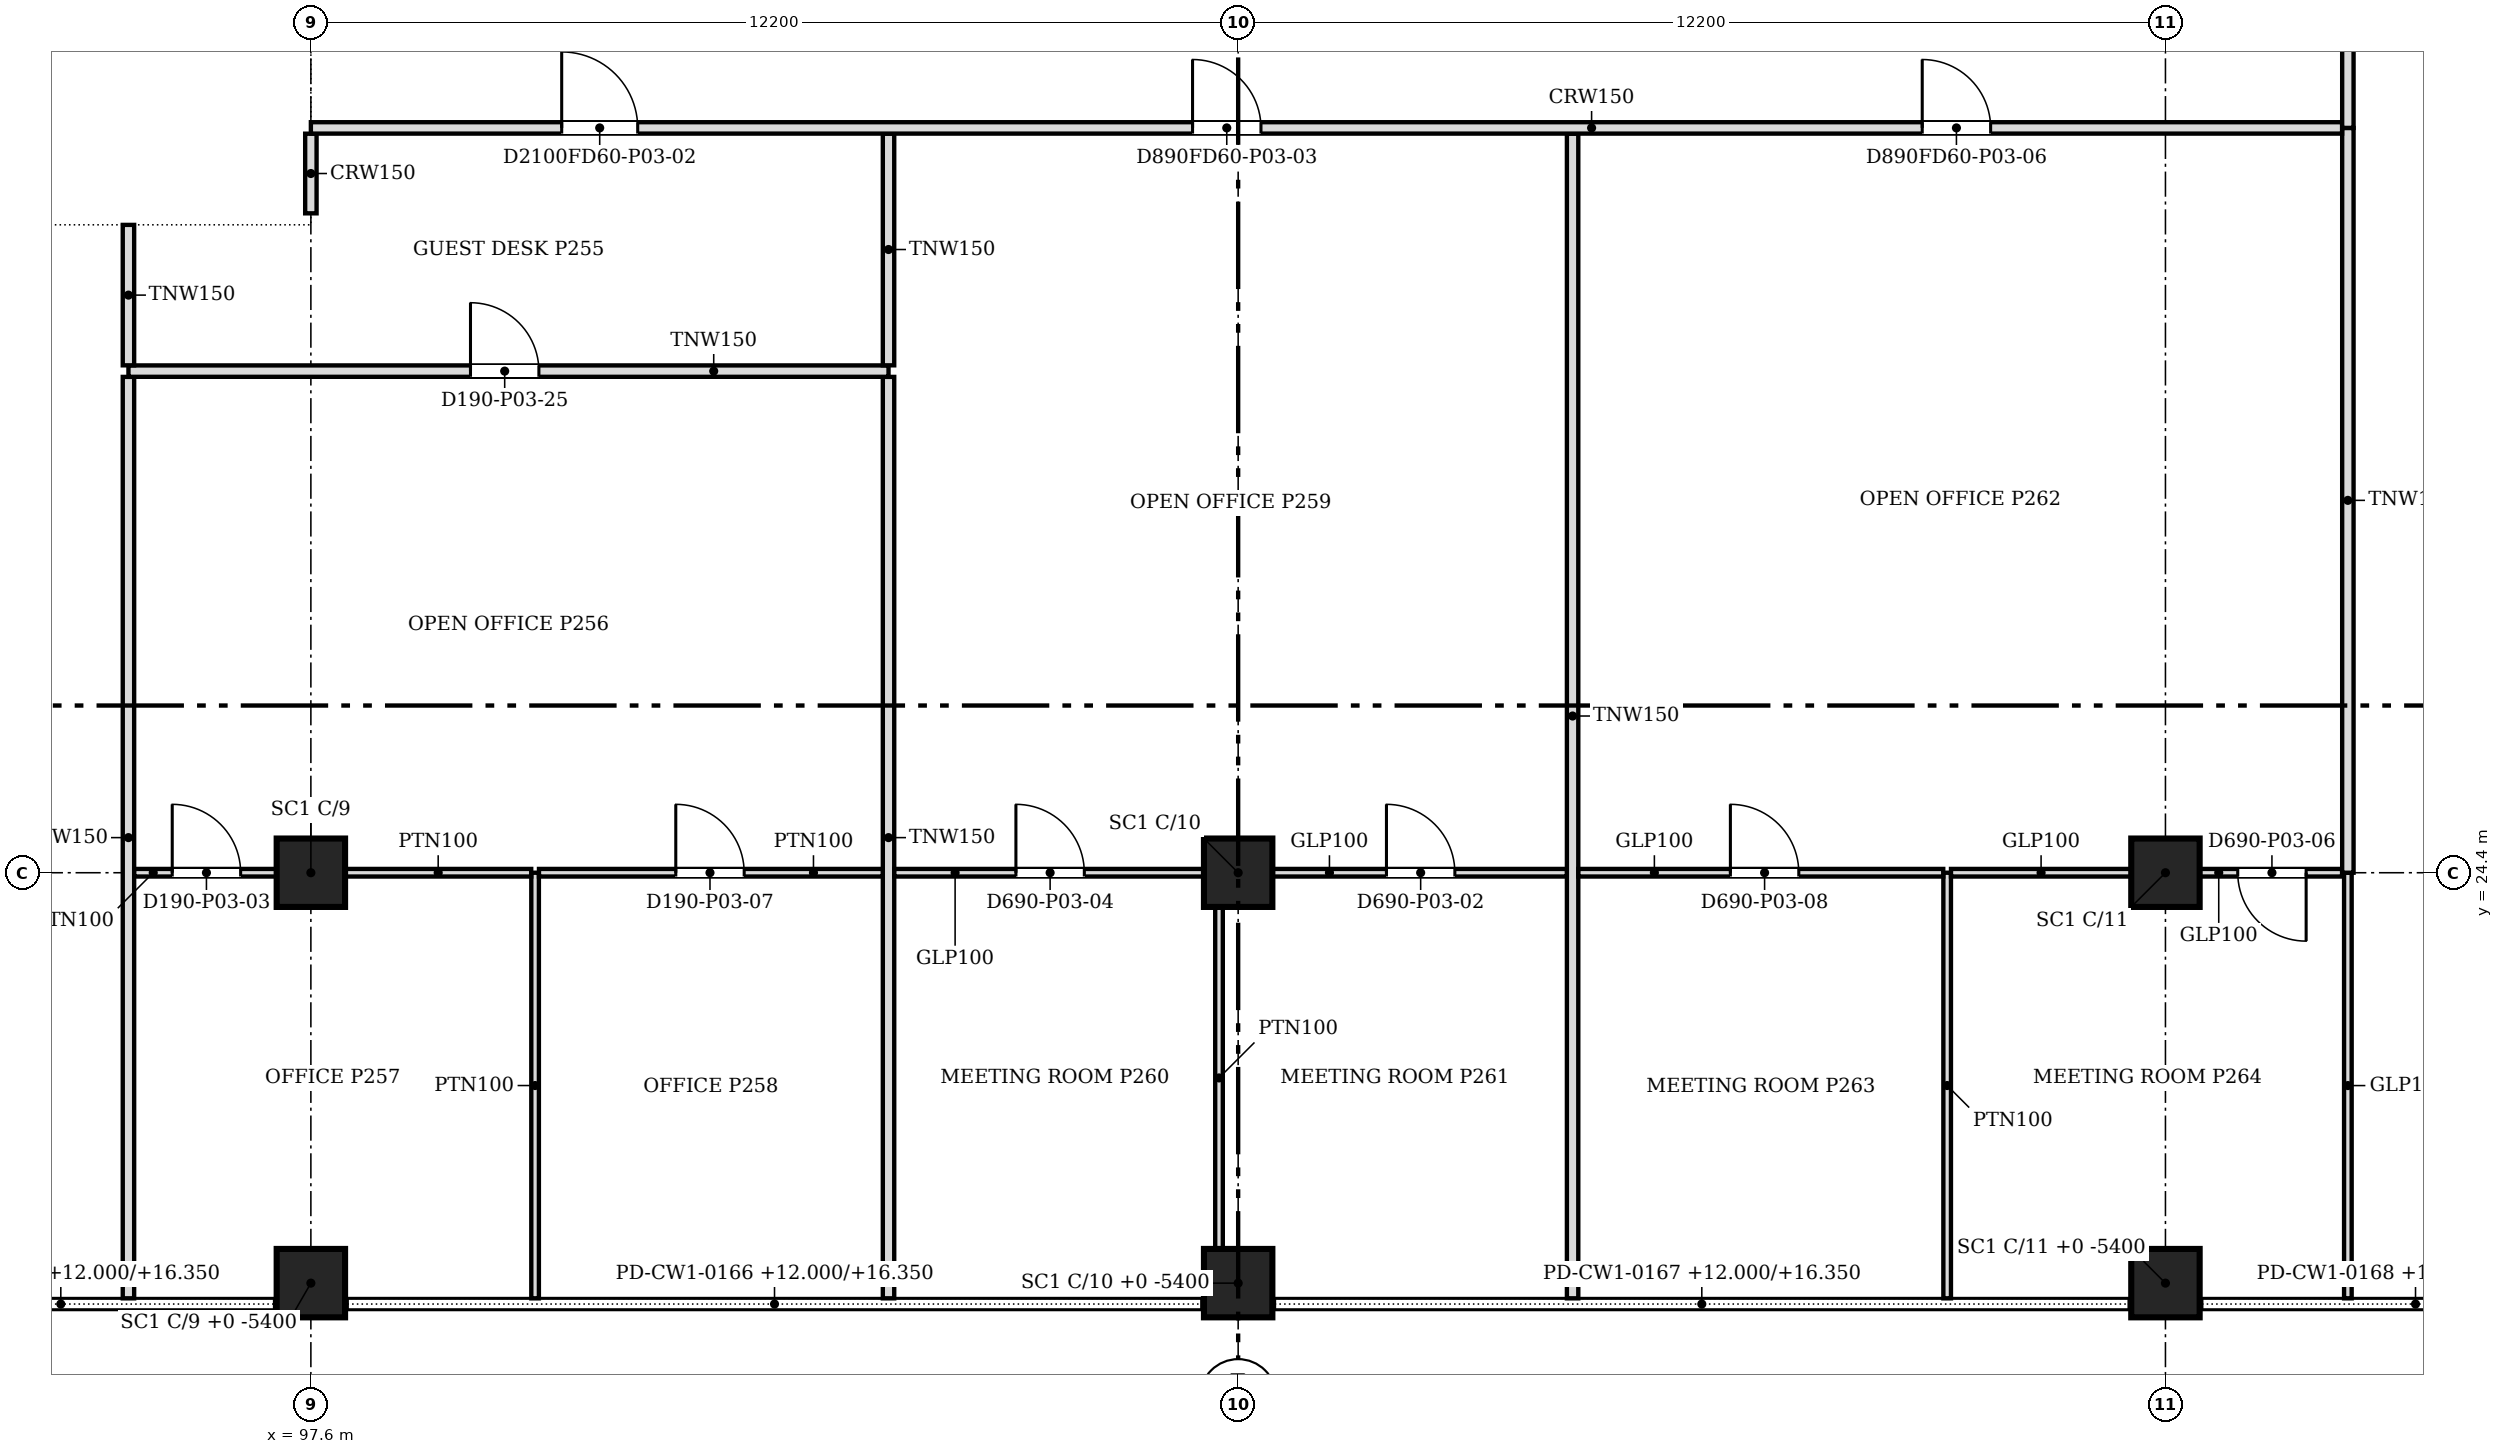
"""IFC4 building model, lengths in metres.
Left out: names, types, materials, properties, quantities, classifications, styles, units other than length and angle.
Written with IfcOpenShell. Run it as: python <this file> out.ifc"""

import sys

from ifc_helpers import new_model, si_unit, direction, frame, frame_2d, origin, origin_2d, place, context, subcontext, project, spatial, rectangle, extrude, source, transform, mapped, element, fill, save


model = new_model("IFC4")
c1 = context("Model", 3, precision=1e-05, world=origin(), true_north=direction((0.0, 1.0)))
c2 = subcontext(c1, "Body", "Model", "MODEL_VIEW")
j1 = project(units=[si_unit("LENGTHUNIT", "METRE"), si_unit("PLANEANGLEUNIT", "RADIAN")], contexts=[c1])
p1 = place(None, origin())
s1 = spatial("IfcSite", under=j1, at=p1, CompositionType="ELEMENT")
p2 = place(p1, origin())
s2 = spatial("IfcBuilding", under=s1, at=p2, CompositionType="ELEMENT")
p3 = place(p2, frame((0.0, 0.0, 12.0)))
s3 = spatial("IfcBuildingStorey", under=s2, at=p3, CompositionType="ELEMENT", Elevation=12.0)
for number, where, z_axis, x_axis in (
    (1, (97.6, 24.4, 0.0), (0.0, 0.0, 1.0), (1.0, 0.0, 0.0)),
    (2, (109.8, 24.4, 0.0), (0.0, 0.0, 1.0), (1.0, 0.0, 0.0)),
    (3, (122.0, 24.4, 0.0), (0.0, 0.0, 1.0), (1.0, 0.0, 0.0)),
    (4, (97.6, 19.0, 0.0), (0.0, 0.0, 1.0), (1.0, 0.0, 0.0)),
    (5, (109.8, 19.0, 0.0), (0.0, 0.0, 1.0), (1.0, 0.0, 0.0)),
    (6, (122.0, 19.0, 0.0), (0.0, 0.0, 1.0), (1.0, 0.0, 0.0)),
):
    element("IfcColumn", number, at=place(p3, frame(where, z_axis=z_axis, x_axis=x_axis)), inside=s3, PredefinedType="COLUMN", context=c2, shape_type="SweptSolid", body=[
        extrude(rectangle(XDim=0.9, YDim=0.9, at=origin_2d()), origin(), (0.0, 0.0, 1.0), 4.6),
    ])
p4 = place(p3, frame((95.2, 18.8, 0.0), z_axis=(0.0, 0.0, 1.0), x_axis=(0.0, 1.0, 0.0)))
e7 = element("IfcWall", 7, at=p4, inside=s3, PredefinedType="PARTITIONING", context=c2, shape_type="SweptSolid", body=[
    extrude(rectangle(XDim=12.124, YDim=0.15, at=frame_2d((6.062, 0.0))), origin(), (0.0, 0.0, 1.0), 3.672),
])
p5 = place(p3, frame((100.55, 18.8, 0.0), z_axis=(0.0, 0.0, 1.0), x_axis=(0.0, 1.0, 0.0)))
e8 = element("IfcWall", 8, at=p5, inside=s3, PredefinedType="PARTITIONING", context=c2, shape_type="SweptSolid", body=[
    extrude(rectangle(XDim=5.6, YDim=0.1, at=frame_2d((2.8, 0.0))), origin(), (0.0, 0.0, 1.0), 3.672),
])
p6 = place(p3, frame((105.2, 18.8, 0.0), z_axis=(0.0, 0.0, 1.0), x_axis=(0.0, 1.0, 0.0)))
e9 = element("IfcWall", 9, at=p6, inside=s3, PredefinedType="PARTITIONING", context=c2, shape_type="SweptSolid", body=[
    extrude(rectangle(XDim=12.124, YDim=0.15, at=frame_2d((6.062, 0.0))), origin(), (0.0, 0.0, 1.0), 3.672),
])
p7 = place(p3, frame((114.2, 18.8, 0.0), z_axis=(0.0, 0.0, 1.0), x_axis=(0.0, 1.0, 0.0)))
e10 = element("IfcWall", 10, at=p7, inside=s3, PredefinedType="PARTITIONING", context=c2, shape_type="SweptSolid", body=[
    extrude(rectangle(XDim=15.324, YDim=0.15, at=frame_2d((7.662, 0.0))), origin(), (0.0, 0.0, 1.0), 3.672),
])
p8 = place(p3, frame((119.128, 18.8, 0.0), z_axis=(0.0, 0.0, 1.0), x_axis=(0.0, 1.0, 0.0)))
e11 = element("IfcWall", 11, at=p8, inside=s3, PredefinedType="PARTITIONING", context=c2, shape_type="SweptSolid", body=[
    extrude(rectangle(XDim=5.6, YDim=0.1, at=frame_2d((2.8, 0.0))), origin(), (0.0, 0.0, 1.0), 3.672),
])
p9 = place(p3, frame((124.4, 18.8, 0.0), z_axis=(0.0, 0.0, 1.0), x_axis=(0.0, 1.0, 0.0)))
e12 = element("IfcWall", 12, at=p9, inside=s3, PredefinedType="PARTITIONING", context=c2, shape_type="SweptSolid", body=[
    extrude(rectangle(XDim=5.599, YDim=0.1, at=frame_2d((2.799, 0.0))), origin(), (0.0, 0.0, 1.0), 3.672),
])
p10 = place(p3, frame((109.548, 19.451, 0.0), z_axis=(0.0, 0.0, 1.0), x_axis=(0.0, 1.0, 0.0)))
e13 = element("IfcWall", 13, at=p10, inside=s3, PredefinedType="PARTITIONING", context=c2, shape_type="SweptSolid", body=[
    extrude(rectangle(XDim=4.498, YDim=0.1, at=frame_2d((2.249, 0.0))), origin(), (0.0, 0.0, 1.0), 3.672),
])
p11 = place(p3, frame((97.149, 24.4, 0.0), z_axis=(0.0, 0.0, 1.0), x_axis=(-1.0, 0.0, 0.0)))
e14 = element("IfcWall", 14, at=p11, inside=s3, PredefinedType="PARTITIONING", context=c2, shape_type="SweptSolid", body=[
    extrude(rectangle(XDim=1.873, YDim=0.1, at=frame_2d((0.937, 0.0))), origin(), (0.0, 0.0, 1.0), 3.672),
])
m1 = source(origin(), c2, "Body", "SweptSolid", [
    extrude(rectangle(XDim=0.9, YDim=2.1, at=frame_2d((0.45, 1.05))), frame((0.0, 0.06, 0.0), z_axis=(0.0, -1.0, 0.0), x_axis=(1.0, 0.0, 0.0)), (0.0, 0.0, 1.0), 0.12),
])
p12 = place(p11, frame((0.473, 0.0, 0.0)))
e15 = element("IfcOpeningElement", 15, at=p12, cuts=e14, PredefinedType="OPENING", context=c2, shape_type="MappedRepresentation", body=[
    mapped(m1, transform((0.0, 0.0, 0.0), scale=1.0)),
])
p13 = place(p3, frame((98.051, 24.4, 0.0), z_axis=(0.0, 0.0, 1.0), x_axis=(1.0, 0.0, 0.0)))
e16 = element("IfcWall", 16, at=p13, inside=s3, PredefinedType="PARTITIONING", context=c2, shape_type="SweptSolid", body=[
    extrude(rectangle(XDim=2.448, YDim=0.1, at=frame_2d((1.224, 0.0))), origin(), (0.0, 0.0, 1.0), 3.672),
])
p14 = place(p3, frame((105.124, 24.4, 0.0), z_axis=(0.0, 0.0, 1.0), x_axis=(-1.0, 0.0, 0.0)))
e17 = element("IfcWall", 17, at=p14, inside=s3, PredefinedType="PARTITIONING", context=c2, shape_type="SweptSolid", body=[
    extrude(rectangle(XDim=4.523, YDim=0.1, at=frame_2d((2.261, 0.0))), origin(), (0.0, 0.0, 1.0), 3.672),
])
p15 = place(p14, frame((1.823, 0.0, 0.0)))
e18 = element("IfcOpeningElement", 18, at=p15, cuts=e17, PredefinedType="OPENING", context=c2, shape_type="MappedRepresentation", body=[
    mapped(m1, transform((0.0, 0.0, 0.0), scale=1.0)),
])
p16 = place(p3, frame((109.349, 24.4, 0.0), z_axis=(0.0, 0.0, 1.0), x_axis=(-1.0, 0.0, 0.0)))
e19 = element("IfcWall", 19, at=p16, inside=s3, PredefinedType="PARTITIONING", context=c2, shape_type="SweptSolid", body=[
    extrude(rectangle(XDim=4.073, YDim=0.1, at=frame_2d((2.037, 0.0))), origin(), (0.0, 0.0, 1.0), 3.672),
])
p17 = place(p16, frame((1.573, 0.0, 0.0)))
e20 = element("IfcOpeningElement", 20, at=p17, cuts=e19, PredefinedType="OPENING", context=c2, shape_type="MappedRepresentation", body=[
    mapped(m1, transform((0.0, 0.0, 0.0), scale=1.0)),
])
p18 = place(p3, frame((114.124, 24.4, 0.0), z_axis=(0.0, 0.0, 1.0), x_axis=(-1.0, 0.0, 0.0)))
e21 = element("IfcWall", 21, at=p18, inside=s3, PredefinedType="PARTITIONING", context=c2, shape_type="SweptSolid", body=[
    extrude(rectangle(XDim=3.873, YDim=0.1, at=frame_2d((1.937, 0.0))), origin(), (0.0, 0.0, 1.0), 3.672),
])
p19 = place(p18, frame((1.473, 0.0, 0.0)))
e22 = element("IfcOpeningElement", 22, at=p19, cuts=e21, PredefinedType="OPENING", context=c2, shape_type="MappedRepresentation", body=[
    mapped(m1, transform((0.0, 0.0, 0.0), scale=1.0)),
])
p20 = place(p3, frame((119.076, 24.4, 0.0), z_axis=(0.0, 0.0, 1.0), x_axis=(-1.0, 0.0, 0.0)))
e23 = element("IfcWall", 23, at=p20, inside=s3, PredefinedType="PARTITIONING", context=c2, shape_type="SweptSolid", body=[
    extrude(rectangle(XDim=4.801, YDim=0.1, at=frame_2d((2.4, 0.0))), origin(), (0.0, 0.0, 1.0), 3.672),
])
p21 = place(p20, frame((1.9, 0.0, 0.0)))
e24 = element("IfcOpeningElement", 24, at=p21, cuts=e23, PredefinedType="OPENING", context=c2, shape_type="MappedRepresentation", body=[
    mapped(m1, transform((0.0, 0.0, 0.0), scale=1.0)),
])
p22 = place(p3, frame((119.178, 24.4, 0.0), z_axis=(0.0, 0.0, 1.0), x_axis=(1.0, 0.0, 0.0)))
e25 = element("IfcWall", 25, at=p22, inside=s3, PredefinedType="PARTITIONING", context=c2, shape_type="SweptSolid", body=[
    extrude(rectangle(XDim=2.371, YDim=0.1, at=frame_2d((1.185, 0.0))), origin(), (0.0, 0.0, 1.0), 3.672),
])
p23 = place(p3, frame((124.324, 24.4, 0.0), z_axis=(0.0, 0.0, 1.0), x_axis=(-1.0, 0.0, 0.0)))
e26 = element("IfcWall", 26, at=p23, inside=s3, PredefinedType="PARTITIONING", context=c2, shape_type="SweptSolid", body=[
    extrude(rectangle(XDim=1.873, YDim=0.1, at=frame_2d((0.937, 0.0))), origin(), (0.0, 0.0, 1.0), 3.672),
])
p24 = place(p23, frame((0.473, 0.0, 0.0)))
e27 = element("IfcOpeningElement", 27, at=p24, cuts=e26, PredefinedType="OPENING", context=c2, shape_type="MappedRepresentation", body=[
    mapped(m1, transform((0.0, 0.0, 0.0), scale=1.0)),
])
p25 = place(p3, frame((124.4, 24.4, 0.0), z_axis=(0.0, 0.0, 1.0), x_axis=(0.0, 1.0, 0.0)))
e28 = element("IfcWall", 28, at=p25, inside=s3, PredefinedType="PARTITIONING", context=c2, shape_type="SweptSolid", body=[
    extrude(rectangle(XDim=9.799, YDim=0.15, at=frame_2d((4.899, 0.0))), origin(), (0.0, 0.0, 1.0), 3.672),
])
p26 = place(p3, frame((105.2, 31.0, 0.0), z_axis=(0.0, 0.0, 1.0), x_axis=(-1.0, 0.0, 0.0)))
e29 = element("IfcWall", 29, at=p26, inside=s3, PredefinedType="PARTITIONING", context=c2, shape_type="SweptSolid", body=[
    extrude(rectangle(XDim=10.0, YDim=0.15, at=frame_2d((5.0, 0.0))), origin(), (0.0, 0.0, 1.0), 3.672),
])
m2 = source(origin(), c2, "Body", "SweptSolid", [
    extrude(rectangle(XDim=0.9, YDim=2.1, at=frame_2d((0.45, 1.05))), frame((0.0, 0.085, 0.0), z_axis=(0.0, -1.0, 0.0), x_axis=(1.0, 0.0, 0.0)), (0.0, 0.0, 1.0), 0.17),
])
p27 = place(p26, frame((4.6, 0.0, 0.0)))
e30 = element("IfcOpeningElement", 30, at=p27, cuts=e29, PredefinedType="OPENING", context=c2, shape_type="MappedRepresentation", body=[
    mapped(m2, transform((0.0, 0.0, 0.0), scale=1.0)),
])
p28 = place(p3, frame((95.2, 31.076, 0.0), z_axis=(0.0, 0.0, 1.0), x_axis=(0.0, 1.0, 0.0)))
e31 = element("IfcWall", 31, at=p28, inside=s3, PredefinedType="PARTITIONING", context=c2, shape_type="SweptSolid", body=[
    extrude(rectangle(XDim=1.848, YDim=0.15, at=frame_2d((0.924, 0.0))), origin(), (0.0, 0.0, 1.0), 3.672),
])
p29 = place(p3, frame((105.2, 31.076, 0.0), z_axis=(0.0, 0.0, 1.0), x_axis=(0.0, 1.0, 0.0)))
e32 = element("IfcWall", 32, at=p29, inside=s3, PredefinedType="PARTITIONING", context=c2, shape_type="SweptSolid", body=[
    extrude(rectangle(XDim=3.048, YDim=0.15, at=frame_2d((1.524, 0.0))), origin(), (0.0, 0.0, 1.0), 3.672),
])
p30 = place(p3, frame((97.6, 33.0, 0.0), z_axis=(0.0, 0.0, 1.0), x_axis=(-1.0, 0.0, 0.0)))
e33 = element("IfcWall", 33, at=p30, inside=s3, PredefinedType="PARTITIONING", context=c2, shape_type="SweptSolid", body=[
    extrude(rectangle(XDim=36.6, YDim=0.15, at=frame_2d((18.3, 0.0))), origin(), (0.0, 0.0, 1.0), 3.672),
])
m3 = source(origin(), c2, "Body", "SweptSolid", [
    extrude(rectangle(XDim=1.0, YDim=2.1, at=frame_2d((0.5, 1.05))), frame((0.0, 0.085, 0.0), z_axis=(0.0, -1.0, 0.0), x_axis=(1.0, 0.0, 0.0)), (0.0, 0.0, 1.0), 0.17),
])
p31 = place(p30, frame((21.099, 0.0, 0.0)))
e34 = element("IfcOpeningElement", 34, at=p31, cuts=e33, PredefinedType="OPENING", context=c2, shape_type="MappedRepresentation", body=[
    mapped(m3, transform((0.0, 0.0, 0.0), scale=1.0)),
])
p32 = place(p30, frame((31.1, 0.0, 0.0)))
e35 = element("IfcOpeningElement", 35, at=p32, cuts=e33, PredefinedType="OPENING", context=c2, shape_type="MappedRepresentation", body=[
    mapped(m3, transform((0.0, 0.0, 0.0), scale=1.0)),
])
p33 = place(p30, frame((9.0, 0.0, 0.0)))
e36 = element("IfcOpeningElement", 36, at=p33, cuts=e33, PredefinedType="OPENING", context=c2, shape_type="MappedRepresentation", body=[
    mapped(m3, transform((0.0, 0.0, 0.0), scale=1.0)),
])
p34 = place(p3, frame((97.6, 33.076, 0.0), z_axis=(0.0, 0.0, 1.0), x_axis=(0.0, 1.0, 0.0)))
e37 = element("IfcWall", 37, at=p34, inside=s3, PredefinedType="PARTITIONING", context=c2, shape_type="SweptSolid", body=[
    extrude(rectangle(XDim=1.048, YDim=0.15, at=frame_2d((0.524, 0.0))), origin(), (0.0, 0.0, 1.0), 3.672),
])
p35 = place(p3, frame((124.324, 34.2, 0.0), z_axis=(0.0, 0.0, 1.0), x_axis=(-1.0, 0.0, 0.0)))
e38 = element("IfcWall", 38, at=p35, inside=s3, PredefinedType="PARTITIONING", context=c2, shape_type="SweptSolid", body=[
    extrude(rectangle(XDim=26.724, YDim=0.15, at=frame_2d((13.362, 0.0))), origin(), (0.0, 0.0, 1.0), 3.672),
])
p36 = place(p35, frame((22.424, 0.0, 0.0)))
e39 = element("IfcOpeningElement", 39, at=p36, cuts=e38, PredefinedType="OPENING", context=c2, shape_type="MappedRepresentation", body=[
    mapped(m3, transform((0.0, 0.0, 0.0), scale=1.0)),
])
p37 = place(p35, frame((14.224, 0.0, 0.0)))
e40 = element("IfcOpeningElement", 40, at=p37, cuts=e38, PredefinedType="OPENING", context=c2, shape_type="MappedRepresentation", body=[
    mapped(m2, transform((0.0, 0.0, 0.0), scale=1.0)),
])
p38 = place(p35, frame((4.624, 0.0, 0.0)))
e41 = element("IfcOpeningElement", 41, at=p38, cuts=e38, PredefinedType="OPENING", context=c2, shape_type="MappedRepresentation", body=[
    mapped(m2, transform((0.0, 0.0, 0.0), scale=1.0)),
])
p39 = place(p3, frame((124.4, 51.2, 0.0), z_axis=(0.0, 0.0, 1.0), x_axis=(0.0, -1.0, 0.0)))
e42 = element("IfcWall", 42, at=p39, inside=s3, PredefinedType="PARTITIONING", context=c2, shape_type="SweptSolid", body=[
    extrude(rectangle(XDim=17.0, YDim=0.15, at=frame_2d((8.5, 0.0))), origin(), (0.0, 0.0, 1.0), 3.672),
])
p40 = place(p39, frame((8.0, 0.0, 0.0)))
e43 = element("IfcOpeningElement", 43, at=p40, cuts=e42, PredefinedType="OPENING", context=c2, shape_type="MappedRepresentation", body=[
    mapped(m3, transform((0.0, 0.0, 0.0), scale=1.0)),
])
m4 = source(origin(), c2, "Body", "SweptSolid", [
    extrude(rectangle(XDim=0.9, YDim=2.1, at=frame_2d((0.45, 1.05))), frame((0.0, 0.025, 0.0), z_axis=(0.0, -1.0, 0.0), x_axis=(1.0, 0.0, 0.0)), (0.0, 0.0, 1.0), 0.05),
])
p41 = place(p19, origin())
e44 = element("IfcDoor", 44, at=p41, inside=s3, OperationType="SINGLE_SWING_RIGHT", PredefinedType="DOOR", context=c2, shape_type="MappedRepresentation", body=[
    mapped(m4, transform((0.0, 0.0, 0.0), scale=1.0)),
])
fill(e22, e44)
p42 = place(p17, origin())
e45 = element("IfcDoor", 45, at=p42, inside=s3, OperationType="SINGLE_SWING_RIGHT", PredefinedType="DOOR", context=c2, shape_type="MappedRepresentation", body=[
    mapped(m4, transform((0.0, 0.0, 0.0), scale=1.0)),
])
fill(e20, e45)
p43 = place(p24, origin())
e46 = element("IfcDoor", 46, at=p43, inside=s3, OperationType="SINGLE_SWING_LEFT", PredefinedType="DOOR", context=c2, shape_type="MappedRepresentation", body=[
    mapped(m4, transform((0.0, 0.0, 0.0), scale=1.0)),
])
fill(e27, e46)
p44 = place(p12, origin())
e47 = element("IfcDoor", 47, at=p44, inside=s3, OperationType="SINGLE_SWING_RIGHT", PredefinedType="DOOR", context=c2, shape_type="MappedRepresentation", body=[
    mapped(m4, transform((0.0, 0.0, 0.0), scale=1.0)),
])
fill(e15, e47)
p45 = place(p15, origin())
e48 = element("IfcDoor", 48, at=p45, inside=s3, OperationType="SINGLE_SWING_RIGHT", PredefinedType="DOOR", context=c2, shape_type="MappedRepresentation", body=[
    mapped(m4, transform((0.0, 0.0, 0.0), scale=1.0)),
])
fill(e18, e48)
p46 = place(p21, origin())
e49 = element("IfcDoor", 49, at=p46, inside=s3, OperationType="SINGLE_SWING_RIGHT", PredefinedType="DOOR", context=c2, shape_type="MappedRepresentation", body=[
    mapped(m4, transform((0.0, 0.0, 0.0), scale=1.0)),
])
fill(e24, e49)
m5 = source(origin(), c2, "Body", "SweptSolid", [
    extrude(rectangle(XDim=1.0, YDim=2.1, at=frame_2d((0.5, 1.05))), frame((0.0, 0.025, 0.0), z_axis=(0.0, -1.0, 0.0), x_axis=(1.0, 0.0, 0.0)), (0.0, 0.0, 1.0), 0.05),
])
p47 = place(p36, origin())
e50 = element("IfcDoor", 50, at=p47, inside=s3, OperationType="SINGLE_SWING_RIGHT", PredefinedType="DOOR", context=c2, shape_type="MappedRepresentation", body=[
    mapped(m5, transform((0.0, 0.0, 0.0), scale=1.0)),
])
fill(e39, e50)
p48 = place(p37, origin())
e51 = element("IfcDoor", 51, at=p48, inside=s3, OperationType="SINGLE_SWING_RIGHT", PredefinedType="DOOR", context=c2, shape_type="MappedRepresentation", body=[
    mapped(m4, transform((0.0, 0.0, 0.0), scale=1.0)),
])
fill(e40, e51)
p49 = place(p27, origin())
e52 = element("IfcDoor", 52, at=p49, inside=s3, OperationType="SINGLE_SWING_RIGHT", PredefinedType="DOOR", context=c2, shape_type="MappedRepresentation", body=[
    mapped(m4, transform((0.0, 0.0, 0.0), scale=1.0)),
])
fill(e30, e52)
p50 = place(p38, origin())
e53 = element("IfcDoor", 53, at=p50, inside=s3, OperationType="SINGLE_SWING_RIGHT", PredefinedType="DOOR", context=c2, shape_type="MappedRepresentation", body=[
    mapped(m4, transform((0.0, 0.0, 0.0), scale=1.0)),
])
fill(e41, e53)
save(model, sys.argv[1])
